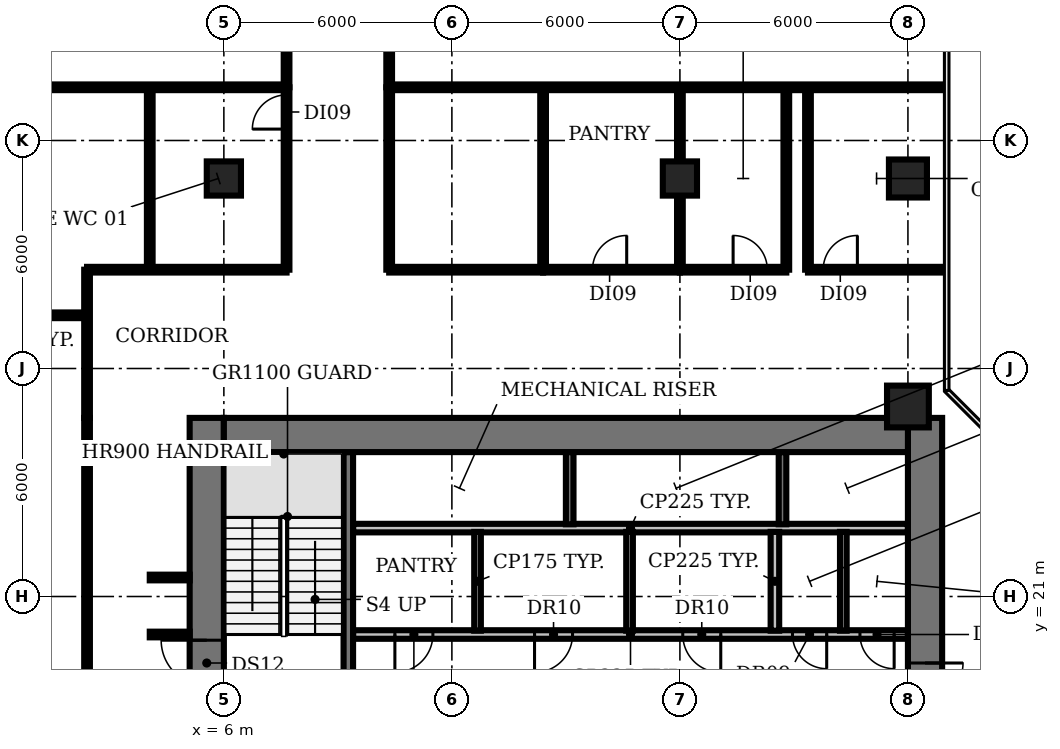
"""IFC4 building model, lengths in metres.
Left out: names, types, materials, properties, quantities, classifications, styles, units other than length and angle.
Written with IfcOpenShell. Run it as: python <this file> out.ifc"""

import sys

from ifc_helpers import new_model, si_unit, direction, frame, frame_2d, origin, origin_2d, place, context, subcontext, project, spatial, rectangle, circle, extrude, element, fill, save


model = new_model("IFC4")
c1 = context("Model", 3, precision=1e-05, world=origin(), true_north=direction((0.0, 1.0)))
c2 = subcontext(c1, "Body", "Model", "MODEL_VIEW")
j1 = project(units=[si_unit("LENGTHUNIT", "METRE"), si_unit("PLANEANGLEUNIT", "RADIAN")], contexts=[c1])
p1 = place(None, origin())
s1 = spatial("IfcSite", under=j1, at=p1, CompositionType="ELEMENT")
p2 = place(p1, origin())
s2 = spatial("IfcBuilding", under=s1, at=p2, CompositionType="ELEMENT")
p3 = place(p2, frame((0.0, 0.0, 24.5)))
s3 = spatial("IfcBuildingStorey", under=s2, at=p3, CompositionType="ELEMENT", Elevation=24.5)
for number, where, z_axis, x_axis in (
    (1, (6.0, 32.0, 0.0), (0.0, 0.0, 1.0), (1.0, 0.0, 0.0)),
    (2, (18.0, 32.0, 0.0), (0.0, 0.0, 1.0), (1.0, 0.0, 0.0)),
):
    element("IfcColumn", number, at=place(p3, frame(where, z_axis=z_axis, x_axis=x_axis)), inside=s3, PredefinedType="COLUMN", context=c2, shape_type="SweptSolid", body=[
        extrude(rectangle(XDim=0.9, YDim=0.9, at=origin_2d()), origin(), (0.0, 0.0, 1.0), 4.15),
    ])
p4 = place(p3, frame((24.0, 26.0, 0.0), z_axis=(0.0, 0.0, 1.0), x_axis=(1.0, 0.0, 0.0)))
e3 = element("IfcColumn", 3, at=p4, inside=s3, PredefinedType="COLUMN", context=c2, shape_type="SweptSolid", body=[
    extrude(circle(Radius=0.55, at=origin_2d()), origin(), (0.0, 0.0, 1.0), 4.15),
])
p5 = place(p3, frame((24.0, 32.0, 0.0), z_axis=(0.0, 0.0, 1.0), x_axis=(1.0, 0.0, 0.0)))
e4 = element("IfcColumn", 4, at=p5, inside=s3, PredefinedType="COLUMN", context=c2, shape_type="SweptSolid", body=[
    extrude(rectangle(XDim=1.0, YDim=1.0, at=origin_2d()), origin(), (0.0, 0.0, 1.0), 4.15),
])
p6 = place(p3, frame((24.0, 20.0, 0.0), z_axis=(0.0, 0.0, 1.0), x_axis=(-1.0, 0.0, 0.0)))
e5 = element("IfcWall", 5, at=p6, inside=s3, PredefinedType="PARTITIONING", context=c2, shape_type="SweptSolid", body=[
    extrude(rectangle(XDim=14.6, YDim=0.225, at=frame_2d((7.3, 0.0))), origin(), (0.0, 0.0, 1.0), 4.15),
])
p7 = place(p6, frame((12.5, 0.0, 0.0)))
e6 = element("IfcOpeningElement", 6, at=p7, cuts=e5, PredefinedType="OPENING", context=c2, shape_type="SweptSolid", body=[
    extrude(rectangle(XDim=1.0, YDim=2.1, at=frame_2d((0.5, 1.05))), frame((0.0, 0.123, 0.0), z_axis=(0.0, -1.0, 0.0), x_axis=(1.0, 0.0, 0.0)), (0.0, 0.0, 1.0), 0.245),
])
p8 = place(p6, frame((8.825, 0.0, 0.0)))
e7 = element("IfcOpeningElement", 7, at=p8, cuts=e5, PredefinedType="OPENING", context=c2, shape_type="SweptSolid", body=[
    extrude(rectangle(XDim=1.0, YDim=2.1, at=frame_2d((0.5, 1.05))), frame((0.0, 0.123, 0.0), z_axis=(0.0, -1.0, 0.0), x_axis=(1.0, 0.0, 0.0)), (0.0, 0.0, 1.0), 0.245),
])
p9 = place(p6, frame((4.925, 0.0, 0.0)))
e8 = element("IfcOpeningElement", 8, at=p9, cuts=e5, PredefinedType="OPENING", context=c2, shape_type="SweptSolid", body=[
    extrude(rectangle(XDim=1.0, YDim=2.1, at=frame_2d((0.5, 1.05))), frame((0.0, 0.123, 0.0), z_axis=(0.0, -1.0, 0.0), x_axis=(1.0, 0.0, 0.0)), (0.0, 0.0, 1.0), 0.245),
])
p10 = place(p6, frame((2.137, 0.0, 0.0)))
e9 = element("IfcOpeningElement", 9, at=p10, cuts=e5, PredefinedType="OPENING", context=c2, shape_type="SweptSolid", body=[
    extrude(rectangle(XDim=0.9, YDim=2.1, at=frame_2d((0.45, 1.05))), frame((0.0, 0.123, 0.0), z_axis=(0.0, -1.0, 0.0), x_axis=(1.0, 0.0, 0.0)), (0.0, 0.0, 1.0), 0.245),
])
p11 = place(p6, frame((0.363, 0.0, 0.0)))
e10 = element("IfcOpeningElement", 10, at=p11, cuts=e5, PredefinedType="OPENING", context=c2, shape_type="SweptSolid", body=[
    extrude(rectangle(XDim=0.9, YDim=2.1, at=frame_2d((0.45, 1.05))), frame((0.0, 0.123, 0.0), z_axis=(0.0, -1.0, 0.0), x_axis=(1.0, 0.0, 0.0)), (0.0, 0.0, 1.0), 0.245),
])
p12 = place(p3, frame((9.4, 22.8, 0.0), z_axis=(0.0, 0.0, 1.0), x_axis=(1.0, 0.0, 0.0)))
e11 = element("IfcWall", 11, at=p12, inside=s3, PredefinedType="PARTITIONING", context=c2, shape_type="SweptSolid", body=[
    extrude(rectangle(XDim=14.6, YDim=0.225, at=frame_2d((7.3, 0.0))), origin(), (0.0, 0.0, 1.0), 4.15),
])
p13 = place(p3, frame((9.275, 18.375, 0.0), z_axis=(0.0, 0.0, 1.0), x_axis=(0.0, 1.0, 0.0)))
e12 = element("IfcWall", 12, at=p13, inside=s3, PredefinedType="SHEAR", context=c2, shape_type="SweptSolid", body=[
    extrude(rectangle(XDim=6.425, YDim=0.25, at=frame_2d((3.212, 0.0))), origin(), (0.0, 0.0, 1.0), 4.15),
])
p14 = place(p3, frame((12.675, 20.1, 0.0), z_axis=(0.0, 0.0, 1.0), x_axis=(0.0, 1.0, 0.0)))
e13 = element("IfcWall", 13, at=p14, inside=s3, PredefinedType="PARTITIONING", context=c2, shape_type="SweptSolid", body=[
    extrude(rectangle(XDim=2.6, YDim=0.175, at=frame_2d((1.3, 0.0))), origin(), (0.0, 0.0, 1.0), 4.15),
])
p15 = place(p3, frame((15.1, 22.9, 0.0), z_axis=(0.0, 0.0, 1.0), x_axis=(0.0, 1.0, 0.0)))
e14 = element("IfcWall", 14, at=p15, inside=s3, PredefinedType="SHEAR", context=c2, shape_type="SweptSolid", body=[
    extrude(rectangle(XDim=1.9, YDim=0.2, at=frame_2d((0.95, 0.0))), origin(), (0.0, 0.0, 1.0), 4.15),
])
p16 = place(p3, frame((16.675, 20.1, 0.0), z_axis=(0.0, 0.0, 1.0), x_axis=(0.0, 1.0, 0.0)))
e15 = element("IfcWall", 15, at=p16, inside=s3, PredefinedType="PARTITIONING", context=c2, shape_type="SweptSolid", body=[
    extrude(rectangle(XDim=2.6, YDim=0.175, at=frame_2d((1.3, 0.0))), origin(), (0.0, 0.0, 1.0), 4.15),
])
p17 = place(p3, frame((20.5, 20.1, 0.0), z_axis=(0.0, 0.0, 1.0), x_axis=(0.0, 1.0, 0.0)))
e16 = element("IfcWall", 16, at=p17, inside=s3, PredefinedType="PARTITIONING", context=c2, shape_type="SweptSolid", body=[
    extrude(rectangle(XDim=2.6, YDim=0.225, at=frame_2d((1.3, 0.0))), origin(), (0.0, 0.0, 1.0), 4.15),
])
p18 = place(p3, frame((20.7, 22.9, 0.0), z_axis=(0.0, 0.0, 1.0), x_axis=(0.0, 1.0, 0.0)))
e17 = element("IfcWall", 17, at=p18, inside=s3, PredefinedType="SHEAR", context=c2, shape_type="SweptSolid", body=[
    extrude(rectangle(XDim=1.9, YDim=0.2, at=frame_2d((0.95, 0.0))), origin(), (0.0, 0.0, 1.0), 4.15),
])
p19 = place(p3, frame((22.3, 20.1, 0.0), z_axis=(0.0, 0.0, 1.0), x_axis=(0.0, 1.0, 0.0)))
e18 = element("IfcWall", 18, at=p19, inside=s3, PredefinedType="PARTITIONING", context=c2, shape_type="SweptSolid", body=[
    extrude(rectangle(XDim=2.6, YDim=0.175, at=frame_2d((1.3, 0.0))), origin(), (0.0, 0.0, 1.0), 4.15),
])
p20 = place(p3, frame((5.55, 4.5, 0.0), z_axis=(0.0, 0.0, 1.0), x_axis=(0.0, 1.0, 0.0)))
e19 = element("IfcWall", 19, at=p20, inside=s3, PredefinedType="SHEAR", context=c2, shape_type="SweptSolid", body=[
    extrude(rectangle(XDim=21.2, YDim=0.9, at=frame_2d((10.6, 0.0))), origin(), (0.0, 0.0, 1.0), 4.15),
])
p21 = place(p20, frame((7.6, 0.0, 0.0)))
e20 = element("IfcOpeningElement", 20, at=p21, cuts=e19, PredefinedType="OPENING", context=c2, shape_type="SweptSolid", body=[
    extrude(rectangle(XDim=1.2, YDim=2.1, at=frame_2d((0.6, 1.05))), frame((0.0, 0.46, 0.0), z_axis=(0.0, -1.0, 0.0), x_axis=(1.0, 0.0, 0.0)), (0.0, 0.0, 1.0), 0.92),
])
p22 = place(p20, frame((14.15, 0.0, 0.0)))
e21 = element("IfcOpeningElement", 21, at=p22, cuts=e19, PredefinedType="OPENING", context=c2, shape_type="SweptSolid", body=[
    extrude(rectangle(XDim=1.2, YDim=2.1, at=frame_2d((0.6, 1.05))), frame((0.0, 0.46, 0.0), z_axis=(0.0, -1.0, 0.0), x_axis=(1.0, 0.0, 0.0)), (0.0, 0.0, 1.0), 0.92),
])
p23 = place(p3, frame((24.45, 25.7, 0.0), z_axis=(0.0, 0.0, 1.0), x_axis=(0.0, -1.0, 0.0)))
e22 = element("IfcWall", 22, at=p23, inside=s3, PredefinedType="SHEAR", context=c2, shape_type="SweptSolid", body=[
    extrude(rectangle(XDim=21.2, YDim=0.9, at=frame_2d((10.6, 0.0))), origin(), (0.0, 0.0, 1.0), 4.15),
])
p24 = place(p23, frame((12.45, 0.0, 0.0)))
e23 = element("IfcOpeningElement", 23, at=p24, cuts=e22, PredefinedType="OPENING", context=c2, shape_type="SweptSolid", body=[
    extrude(rectangle(XDim=0.9, YDim=2.1, at=frame_2d((0.45, 1.05))), frame((0.0, 0.46, 0.0), z_axis=(0.0, -1.0, 0.0), x_axis=(1.0, 0.0, 0.0)), (0.0, 0.0, 1.0), 0.92),
])
p25 = place(p23, frame((6.45, 0.0, 0.0)))
e24 = element("IfcOpeningElement", 24, at=p25, cuts=e22, PredefinedType="OPENING", context=c2, shape_type="SweptSolid", body=[
    extrude(rectangle(XDim=2.0, YDim=2.1, at=frame_2d((1.0, 1.05))), frame((0.0, 0.46, 0.0), z_axis=(0.0, -1.0, 0.0), x_axis=(1.0, 0.0, 0.0)), (0.0, 0.0, 1.0), 0.92),
])
p26 = place(p3, frame((6.0, 25.25, 0.0), z_axis=(0.0, 0.0, 1.0), x_axis=(1.0, 0.0, 0.0)))
e25 = element("IfcWall", 25, at=p26, inside=s3, PredefinedType="SHEAR", context=c2, shape_type="SweptSolid", body=[
    extrude(rectangle(XDim=18.0, YDim=0.9, at=frame_2d((9.0, 0.0))), origin(), (0.0, 0.0, 1.0), 4.15),
])
p27 = place(p3, frame((-0.97, 28.4, 0.0), z_axis=(0.0, 0.0, 1.0), x_axis=(1.0, 0.0, 0.0)))
e26 = element("IfcWall", 26, at=p27, inside=s3, PredefinedType="PARTITIONING", context=c2, shape_type="SweptSolid", body=[
    extrude(rectangle(XDim=3.37, YDim=0.15, at=frame_2d((1.685, 0.0))), origin(), (0.0, 0.0, 1.0), 3.08),
])
p28 = place(p3, frame((-0.97, 34.4, 0.0), z_axis=(0.0, 0.0, 1.0), x_axis=(1.0, 0.0, 0.0)))
e27 = element("IfcWall", 27, at=p28, inside=s3, PredefinedType="PARTITIONING", context=c2, shape_type="SweptSolid", body=[
    extrude(rectangle(XDim=8.62, YDim=0.15, at=frame_2d((4.31, 0.0))), origin(), (0.0, 0.0, 1.0), 3.08),
])
p29 = place(p3, frame((2.4, 4.5, 0.0), z_axis=(0.0, 0.0, 1.0), x_axis=(0.0, 1.0, 0.0)))
e28 = element("IfcWall", 28, at=p29, inside=s3, PredefinedType="PARTITIONING", context=c2, shape_type="SweptSolid", body=[
    extrude(rectangle(XDim=21.2, YDim=0.15, at=frame_2d((10.6, 0.0))), origin(), (0.0, 0.0, 1.0), 3.08),
])
p30 = place(p29, frame((10.8, 0.0, 0.0)))
e29 = element("IfcOpeningElement", 29, at=p30, cuts=e28, PredefinedType="OPENING", context=c2, shape_type="SweptSolid", body=[
    extrude(rectangle(XDim=1.2, YDim=2.1, at=frame_2d((0.6, 1.05))), frame((0.0, 0.085, 0.0), z_axis=(0.0, -1.0, 0.0), x_axis=(1.0, 0.0, 0.0)), (0.0, 0.0, 1.0), 0.17),
])
p31 = place(p3, frame((2.4, 25.7, 0.0), z_axis=(0.0, 0.0, 1.0), x_axis=(0.0, 1.0, 0.0)))
e30 = element("IfcWall", 30, at=p31, inside=s3, PredefinedType="PARTITIONING", context=c2, shape_type="SweptSolid", body=[
    extrude(rectangle(XDim=3.9, YDim=0.15, at=frame_2d((1.95, 0.0))), origin(), (0.0, 0.0, 1.0), 3.08),
])
p32 = place(p3, frame((2.4, 29.6, 0.0), z_axis=(0.0, 0.0, 1.0), x_axis=(1.0, 0.0, 0.0)))
e31 = element("IfcWall", 31, at=p32, inside=s3, PredefinedType="PARTITIONING", context=c2, shape_type="SweptSolid", body=[
    extrude(rectangle(XDim=5.25, YDim=0.15, at=frame_2d((2.625, 0.0))), origin(), (0.0, 0.0, 1.0), 3.08),
])
for number, where, z_axis, x_axis in (
    (32, (4.05, 20.0, 0.0), (0.0, 0.0, 1.0), (1.0, 0.0, 0.0)),
    (33, (4.05, 21.5, 0.0), (0.0, 0.0, 1.0), (1.0, 0.0, 0.0)),
):
    element("IfcWall", number, at=place(p3, frame(where, z_axis=z_axis, x_axis=x_axis)), inside=s3, PredefinedType="PARTITIONING", context=c2, shape_type="SweptSolid", body=[
        extrude(rectangle(XDim=1.05, YDim=0.15, at=frame_2d((0.525, 0.0))), origin(), (0.0, 0.0, 1.0), 3.08),
    ])
p33 = place(p3, frame((4.05, 29.6, 0.0), z_axis=(0.0, 0.0, 1.0), x_axis=(0.0, 1.0, 0.0)))
e34 = element("IfcWall", 34, at=p33, inside=s3, PredefinedType="PARTITIONING", context=c2, shape_type="SweptSolid", body=[
    extrude(rectangle(XDim=4.8, YDim=0.15, at=frame_2d((2.4, 0.0))), origin(), (0.0, 0.0, 1.0), 3.08),
])
p34 = place(p3, frame((7.65, 29.6, 0.0), z_axis=(0.0, 0.0, 1.0), x_axis=(0.0, 1.0, 0.0)))
e35 = element("IfcWall", 35, at=p34, inside=s3, PredefinedType="PARTITIONING", context=c2, shape_type="SweptSolid", body=[
    extrude(rectangle(XDim=4.8, YDim=0.15, at=frame_2d((2.4, 0.0))), origin(), (0.0, 0.0, 1.0), 3.08),
])
p35 = place(p34, frame((3.7, 0.0, 0.0)))
e36 = element("IfcOpeningElement", 36, at=p35, cuts=e35, PredefinedType="OPENING", context=c2, shape_type="SweptSolid", body=[
    extrude(rectangle(XDim=0.9, YDim=2.1, at=frame_2d((0.45, 1.05))), frame((0.0, 0.085, 0.0), z_axis=(0.0, -1.0, 0.0), x_axis=(1.0, 0.0, 0.0)), (0.0, 0.0, 1.0), 0.17),
])
p36 = place(p3, frame((7.65, 34.4, 0.0), z_axis=(0.0, 0.0, 1.0), x_axis=(0.0, 1.0, 0.0)))
e37 = element("IfcWall", 37, at=p36, inside=s3, PredefinedType="PARTITIONING", context=c2, shape_type="SweptSolid", body=[
    extrude(rectangle(XDim=4.6, YDim=0.15, at=frame_2d((2.3, 0.0))), origin(), (0.0, 0.0, 1.0), 3.08),
])
p37 = place(p36, frame((1.9, 0.0, 0.0)))
e38 = element("IfcOpeningElement", 38, at=p37, cuts=e37, PredefinedType="OPENING", context=c2, shape_type="SweptSolid", body=[
    extrude(rectangle(XDim=1.0, YDim=2.1, at=frame_2d((0.5, 1.05))), frame((0.0, 0.085, 0.0), z_axis=(0.0, -1.0, 0.0), x_axis=(1.0, 0.0, 0.0)), (0.0, 0.0, 1.0), 0.17),
])
p38 = place(p3, frame((10.35, 29.6, 0.0), z_axis=(0.0, 0.0, 1.0), x_axis=(0.0, 1.0, 0.0)))
e39 = element("IfcWall", 39, at=p38, inside=s3, PredefinedType="PARTITIONING", context=c2, shape_type="SweptSolid", body=[
    extrude(rectangle(XDim=4.8, YDim=0.15, at=frame_2d((2.4, 0.0))), origin(), (0.0, 0.0, 1.0), 3.08),
])
p39 = place(p3, frame((10.35, 29.6, 0.0), z_axis=(0.0, 0.0, 1.0), x_axis=(1.0, 0.0, 0.0)))
e40 = element("IfcWall", 40, at=p39, inside=s3, PredefinedType="PARTITIONING", context=c2, shape_type="SweptSolid", body=[
    extrude(rectangle(XDim=4.05, YDim=0.15, at=frame_2d((2.025, 0.0))), origin(), (0.0, 0.0, 1.0), 3.08),
])
p40 = place(p3, frame((10.35, 34.4, 0.0), z_axis=(0.0, 0.0, 1.0), x_axis=(1.0, 0.0, 0.0)))
e41 = element("IfcWall", 41, at=p40, inside=s3, PredefinedType="PARTITIONING", context=c2, shape_type="SweptSolid", body=[
    extrude(rectangle(XDim=14.62, YDim=0.15, at=frame_2d((7.31, 0.0))), origin(), (0.0, 0.0, 1.0), 3.08),
])
p41 = place(p3, frame((10.35, 51.0, 0.0), z_axis=(0.0, 0.0, 1.0), x_axis=(0.0, -1.0, 0.0)))
e42 = element("IfcWall", 42, at=p41, inside=s3, PredefinedType="PARTITIONING", context=c2, shape_type="SweptSolid", body=[
    extrude(rectangle(XDim=16.6, YDim=0.15, at=frame_2d((8.3, 0.0))), origin(), (0.0, 0.0, 1.0), 3.08),
])
p42 = place(p41, frame((7.7, 0.0, 0.0)))
e43 = element("IfcOpeningElement", 43, at=p42, cuts=e42, PredefinedType="OPENING", context=c2, shape_type="SweptSolid", body=[
    extrude(rectangle(XDim=1.2, YDim=2.1, at=frame_2d((0.6, 1.05))), frame((0.0, 0.085, 0.0), z_axis=(0.0, -1.0, 0.0), x_axis=(1.0, 0.0, 0.0)), (0.0, 0.0, 1.0), 0.17),
])
p43 = place(p3, frame((14.4, 29.6, 0.0), z_axis=(0.0, 0.0, 1.0), x_axis=(0.0, 1.0, 0.0)))
e44 = element("IfcWall", 44, at=p43, inside=s3, PredefinedType="PARTITIONING", context=c2, shape_type="SweptSolid", body=[
    extrude(rectangle(XDim=4.8, YDim=0.15, at=frame_2d((2.4, 0.0))), origin(), (0.0, 0.0, 1.0), 3.08),
])
p44 = place(p3, frame((14.4, 29.6, 0.0), z_axis=(0.0, 0.0, 1.0), x_axis=(1.0, 0.0, 0.0)))
e45 = element("IfcWall", 45, at=p44, inside=s3, PredefinedType="PARTITIONING", context=c2, shape_type="SweptSolid", body=[
    extrude(rectangle(XDim=3.6, YDim=0.15, at=frame_2d((1.8, 0.0))), origin(), (0.0, 0.0, 1.0), 3.08),
])
p45 = place(p44, frame((1.3, 0.0, 0.0)))
e46 = element("IfcOpeningElement", 46, at=p45, cuts=e45, PredefinedType="OPENING", context=c2, shape_type="SweptSolid", body=[
    extrude(rectangle(XDim=0.9, YDim=2.1, at=frame_2d((0.45, 1.05))), frame((0.0, 0.085, 0.0), z_axis=(0.0, -1.0, 0.0), x_axis=(1.0, 0.0, 0.0)), (0.0, 0.0, 1.0), 0.17),
])
p46 = place(p3, frame((18.0, 29.6, 0.0), z_axis=(0.0, 0.0, 1.0), x_axis=(0.0, 1.0, 0.0)))
e47 = element("IfcWall", 47, at=p46, inside=s3, PredefinedType="PARTITIONING", context=c2, shape_type="SweptSolid", body=[
    extrude(rectangle(XDim=4.8, YDim=0.15, at=frame_2d((2.4, 0.0))), origin(), (0.0, 0.0, 1.0), 3.08),
])
p47 = place(p3, frame((18.0, 29.6, 0.0), z_axis=(0.0, 0.0, 1.0), x_axis=(1.0, 0.0, 0.0)))
e48 = element("IfcWall", 48, at=p47, inside=s3, PredefinedType="PARTITIONING", context=c2, shape_type="SweptSolid", body=[
    extrude(rectangle(XDim=2.8, YDim=0.15, at=frame_2d((1.4, 0.0))), origin(), (0.0, 0.0, 1.0), 3.08),
])
p48 = place(p47, frame((1.4, 0.0, 0.0)))
e49 = element("IfcOpeningElement", 49, at=p48, cuts=e48, PredefinedType="OPENING", context=c2, shape_type="SweptSolid", body=[
    extrude(rectangle(XDim=0.9, YDim=2.1, at=frame_2d((0.45, 1.05))), frame((0.0, 0.085, 0.0), z_axis=(0.0, -1.0, 0.0), x_axis=(1.0, 0.0, 0.0)), (0.0, 0.0, 1.0), 0.17),
])
for number, where, z_axis, x_axis in (
    (50, (20.8, 29.6, 0.0), (0.0, 0.0, 1.0), (0.0, 1.0, 0.0)),
    (51, (21.37, 29.6, 0.0), (0.0, 0.0, 1.0), (0.0, 1.0, 0.0)),
):
    element("IfcWall", number, at=place(p3, frame(where, z_axis=z_axis, x_axis=x_axis)), inside=s3, PredefinedType="PARTITIONING", context=c2, shape_type="SweptSolid", body=[
        extrude(rectangle(XDim=4.8, YDim=0.15, at=frame_2d((2.4, 0.0))), origin(), (0.0, 0.0, 1.0), 3.08),
    ])
p49 = place(p3, frame((21.37, 29.6, 0.0), z_axis=(0.0, 0.0, 1.0), x_axis=(1.0, 0.0, 0.0)))
e52 = element("IfcWall", 52, at=p49, inside=s3, PredefinedType="PARTITIONING", context=c2, shape_type="SweptSolid", body=[
    extrude(rectangle(XDim=3.6, YDim=0.15, at=frame_2d((1.8, 0.0))), origin(), (0.0, 0.0, 1.0), 3.08),
])
p50 = place(p49, frame((0.4, 0.0, 0.0)))
e53 = element("IfcOpeningElement", 53, at=p50, cuts=e52, PredefinedType="OPENING", context=c2, shape_type="SweptSolid", body=[
    extrude(rectangle(XDim=0.9, YDim=2.1, at=frame_2d((0.45, 1.05))), frame((0.0, 0.085, 0.0), z_axis=(0.0, -1.0, 0.0), x_axis=(1.0, 0.0, 0.0)), (0.0, 0.0, 1.0), 0.17),
])
p51 = place(p7, origin())
e54 = element("IfcDoor", 54, at=p51, inside=s3, OperationType="SINGLE_SWING_RIGHT", PredefinedType="DOOR", context=c2, shape_type="SweptSolid", body=[
    extrude(rectangle(XDim=1.0, YDim=2.1, at=frame_2d((0.5, 1.05))), frame((0.0, 0.025, 0.0), z_axis=(0.0, -1.0, 0.0), x_axis=(1.0, 0.0, 0.0)), (0.0, 0.0, 1.0), 0.05),
])
fill(e6, e54)
p52 = place(p8, origin())
e55 = element("IfcDoor", 55, at=p52, inside=s3, OperationType="SINGLE_SWING_RIGHT", PredefinedType="DOOR", context=c2, shape_type="SweptSolid", body=[
    extrude(rectangle(XDim=1.0, YDim=2.1, at=frame_2d((0.5, 1.05))), frame((0.0, 0.025, 0.0), z_axis=(0.0, -1.0, 0.0), x_axis=(1.0, 0.0, 0.0)), (0.0, 0.0, 1.0), 0.05),
])
fill(e7, e55)
p53 = place(p9, origin())
e56 = element("IfcDoor", 56, at=p53, inside=s3, OperationType="SINGLE_SWING_LEFT", PredefinedType="DOOR", context=c2, shape_type="SweptSolid", body=[
    extrude(rectangle(XDim=1.0, YDim=2.1, at=frame_2d((0.5, 1.05))), frame((0.0, 0.025, 0.0), z_axis=(0.0, -1.0, 0.0), x_axis=(1.0, 0.0, 0.0)), (0.0, 0.0, 1.0), 0.05),
])
fill(e8, e56)
p54 = place(p10, origin())
e57 = element("IfcDoor", 57, at=p54, inside=s3, OperationType="SINGLE_SWING_LEFT", PredefinedType="DOOR", context=c2, shape_type="SweptSolid", body=[
    extrude(rectangle(XDim=0.9, YDim=2.1, at=frame_2d((0.45, 1.05))), frame((0.0, 0.025, 0.0), z_axis=(0.0, -1.0, 0.0), x_axis=(1.0, 0.0, 0.0)), (0.0, 0.0, 1.0), 0.05),
])
fill(e9, e57)
p55 = place(p11, origin())
e58 = element("IfcDoor", 58, at=p55, inside=s3, OperationType="SINGLE_SWING_LEFT", PredefinedType="DOOR", context=c2, shape_type="SweptSolid", body=[
    extrude(rectangle(XDim=0.9, YDim=2.1, at=frame_2d((0.45, 1.05))), frame((0.0, 0.025, 0.0), z_axis=(0.0, -1.0, 0.0), x_axis=(1.0, 0.0, 0.0)), (0.0, 0.0, 1.0), 0.05),
])
fill(e10, e58)
p56 = place(p22, origin())
e59 = element("IfcDoor", 59, at=p56, inside=s3, OperationType="SINGLE_SWING_RIGHT", PredefinedType="DOOR", context=c2, shape_type="SweptSolid", body=[
    extrude(rectangle(XDim=1.2, YDim=2.1, at=frame_2d((0.6, 1.05))), frame((0.0, 0.025, 0.0), z_axis=(0.0, -1.0, 0.0), x_axis=(1.0, 0.0, 0.0)), (0.0, 0.0, 1.0), 0.05),
])
fill(e21, e59)
p57 = place(p25, origin())
e60 = element("IfcDoor", 60, at=p57, inside=s3, OperationType="DOUBLE_DOOR_SINGLE_SWING", PredefinedType="DOOR", context=c2, shape_type="SweptSolid", body=[
    extrude(rectangle(XDim=2.0, YDim=2.1, at=frame_2d((1.0, 1.05))), frame((0.0, 0.025, 0.0), z_axis=(0.0, -1.0, 0.0), x_axis=(1.0, 0.0, 0.0)), (0.0, 0.0, 1.0), 0.05),
])
fill(e24, e60)
p58 = place(p35, origin())
e61 = element("IfcDoor", 61, at=p58, inside=s3, OperationType="SINGLE_SWING_LEFT", PredefinedType="DOOR", context=c2, shape_type="SweptSolid", body=[
    extrude(rectangle(XDim=0.9, YDim=2.1, at=frame_2d((0.45, 1.05))), frame((0.0, 0.025, 0.0), z_axis=(0.0, -1.0, 0.0), x_axis=(1.0, 0.0, 0.0)), (0.0, 0.0, 1.0), 0.05),
])
fill(e36, e61)
p59 = place(p45, origin())
e62 = element("IfcDoor", 62, at=p59, inside=s3, OperationType="SINGLE_SWING_RIGHT", PredefinedType="DOOR", context=c2, shape_type="SweptSolid", body=[
    extrude(rectangle(XDim=0.9, YDim=2.1, at=frame_2d((0.45, 1.05))), frame((0.0, 0.025, 0.0), z_axis=(0.0, -1.0, 0.0), x_axis=(1.0, 0.0, 0.0)), (0.0, 0.0, 1.0), 0.05),
])
fill(e46, e62)
p60 = place(p48, origin())
e63 = element("IfcDoor", 63, at=p60, inside=s3, OperationType="SINGLE_SWING_LEFT", PredefinedType="DOOR", context=c2, shape_type="SweptSolid", body=[
    extrude(rectangle(XDim=0.9, YDim=2.1, at=frame_2d((0.45, 1.05))), frame((0.0, 0.025, 0.0), z_axis=(0.0, -1.0, 0.0), x_axis=(1.0, 0.0, 0.0)), (0.0, 0.0, 1.0), 0.05),
])
fill(e49, e63)
p61 = place(p50, origin())
e64 = element("IfcDoor", 64, at=p61, inside=s3, OperationType="SINGLE_SWING_RIGHT", PredefinedType="DOOR", context=c2, shape_type="SweptSolid", body=[
    extrude(rectangle(XDim=0.9, YDim=2.1, at=frame_2d((0.45, 1.05))), frame((0.0, 0.025, 0.0), z_axis=(0.0, -1.0, 0.0), x_axis=(1.0, 0.0, 0.0)), (0.0, 0.0, 1.0), 0.05),
])
fill(e53, e64)
save(model, sys.argv[1])
